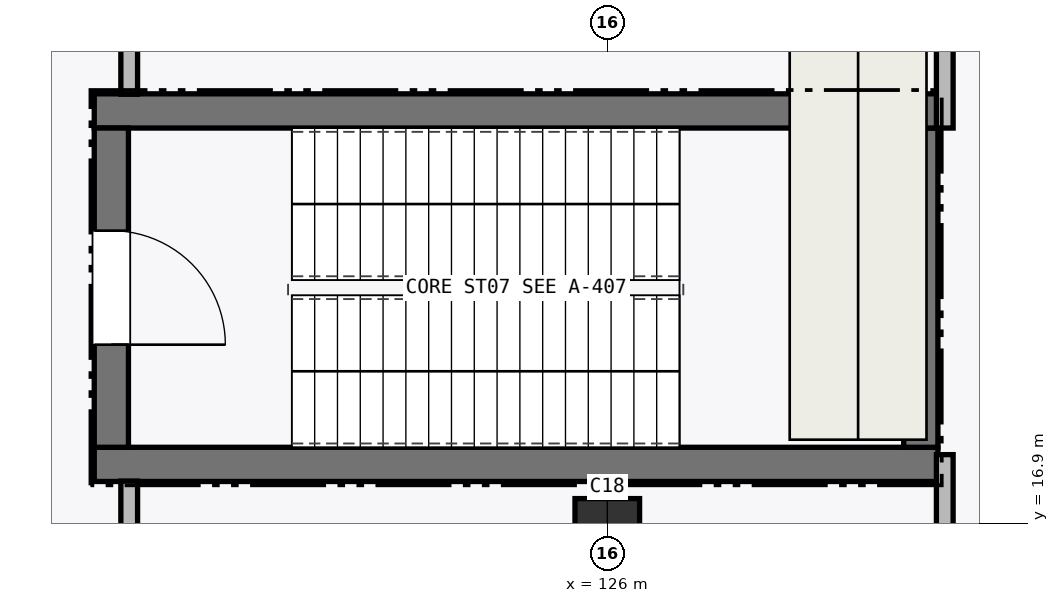
"""IFC4 building model, lengths in metres.
Left out: names, types, materials, properties, quantities, classifications, styles, units other than length and angle.
Written with IfcOpenShell. Run it as: python <this file> out.ifc"""

import sys

from ifc_helpers import new_model, si_unit, direction, frame, frame_2d, origin, origin_2d, place, context, subcontext, project, spatial, rectangle, extrude, element, fill, save


model = new_model("IFC4")
c1 = context("Model", 3, precision=1e-05, world=origin(), true_north=direction((0.0, 1.0)))
c2 = subcontext(c1, "Body", "Model", "MODEL_VIEW")
j1 = project(units=[si_unit("LENGTHUNIT", "METRE"), si_unit("PLANEANGLEUNIT", "RADIAN")], contexts=[c1])
p1 = place(None, origin())
s1 = spatial("IfcSite", under=j1, at=p1, CompositionType="ELEMENT")
p2 = place(p1, origin())
s2 = spatial("IfcBuilding", under=s1, at=p2, CompositionType="ELEMENT")
p3 = place(p2, frame((0.0, 0.0, -5.4)))
s3 = spatial("IfcBuildingStorey", under=s2, at=p3, CompositionType="ELEMENT", Elevation=-5.4)
p4 = place(p3, frame((126.0, 16.8, 0.0), z_axis=(0.0, 0.0, 1.0), x_axis=(1.0, 0.0, 0.0)))
e1 = element("IfcColumn", 1, at=p4, inside=s3, PredefinedType="COLUMN", context=c2, shape_type="SweptSolid", body=[
    extrude(rectangle(XDim=0.85, YDim=0.85, at=origin_2d()), origin(), (0.0, 0.0, 1.0), 5.4),
])
p5 = place(p3, frame((119.25, 17.675, 0.0), z_axis=(0.0, 0.0, 1.0), x_axis=(1.0, 0.0, 0.0)))
e2 = element("IfcWall", 2, at=p5, inside=s3, PredefinedType="SHEAR", context=c2, shape_type="SweptSolid", body=[
    extrude(rectangle(XDim=11.1, YDim=0.45, at=frame_2d((5.55, 0.0))), origin(), (0.0, 0.0, 1.0), 5.145),
])
p6 = place(p3, frame((130.125, 17.9, 0.0), z_axis=(0.0, 0.0, 1.0), x_axis=(0.0, 1.0, 0.0)))
e3 = element("IfcWall", 3, at=p6, inside=s3, PredefinedType="SHEAR", context=c2, shape_type="SweptSolid", body=[
    extrude(rectangle(XDim=4.2, YDim=0.45, at=frame_2d((2.1, 0.0))), origin(), (0.0, 0.0, 1.0), 5.145),
])
p7 = place(p3, frame((130.35, 22.325, 0.0), z_axis=(0.0, 0.0, 1.0), x_axis=(-1.0, 0.0, 0.0)))
e4 = element("IfcWall", 4, at=p7, inside=s3, PredefinedType="SHEAR", context=c2, shape_type="SweptSolid", body=[
    extrude(rectangle(XDim=11.1, YDim=0.45, at=frame_2d((5.55, 0.0))), origin(), (0.0, 0.0, 1.0), 5.145),
])
p8 = place(p3, frame((119.475, 22.1, 0.0), z_axis=(0.0, 0.0, 1.0), x_axis=(0.0, -1.0, 0.0)))
e5 = element("IfcWall", 5, at=p8, inside=s3, PredefinedType="SHEAR", context=c2, shape_type="SweptSolid", body=[
    extrude(rectangle(XDim=4.2, YDim=0.45, at=frame_2d((2.1, 0.0))), origin(), (0.0, 0.0, 1.0), 5.145),
])
p9 = place(p8, frame((1.35, 0.0, 0.0)))
e6 = element("IfcOpeningElement", 6, at=p9, cuts=e5, PredefinedType="OPENING", context=c2, shape_type="SweptSolid", body=[
    extrude(rectangle(XDim=1.5, YDim=2.15, at=frame_2d((0.75, 1.075))), frame((0.0, 0.235, 0.0), z_axis=(0.0, -1.0, 0.0), x_axis=(1.0, 0.0, 0.0)), (0.0, 0.0, 1.0), 0.47),
])
p10 = place(p3, frame((119.71, 29.15, 0.0), z_axis=(0.0, 0.0, 1.0), x_axis=(0.0, -1.0, 0.0)))
e7 = element("IfcWall", 7, at=p10, inside=s3, PredefinedType="PARTITIONING", context=c2, shape_type="SweptSolid", body=[
    extrude(rectangle(XDim=6.605, YDim=0.22, at=frame_2d((3.302, 0.0))), origin(), (0.0, 0.0, 1.0), 5.145),
])
p11 = place(p3, frame((119.71, 17.455, 0.0), z_axis=(0.0, 0.0, 1.0), x_axis=(0.0, -1.0, 0.0)))
e8 = element("IfcWall", 8, at=p11, inside=s3, PredefinedType="PARTITIONING", context=c2, shape_type="SweptSolid", body=[
    extrude(rectangle(XDim=3.655, YDim=0.22, at=frame_2d((1.828, 0.0))), origin(), (0.0, 0.0, 1.0), 5.145),
])
p12 = place(p3, frame((130.44, 8.61, 0.0), z_axis=(0.0, 0.0, 1.0), x_axis=(0.0, 1.0, 0.0)))
e9 = element("IfcWall", 9, at=p12, inside=s3, PredefinedType="PARTITIONING", context=c2, shape_type="SweptSolid", body=[
    extrude(rectangle(XDim=9.193, YDim=0.22, at=frame_2d((4.597, 0.0))), origin(), (0.0, 0.0, 1.0), 5.145),
])
p13 = place(p3, frame((130.44, 22.1, 0.0), z_axis=(0.0, 0.0, 1.0), x_axis=(0.0, 1.0, 0.0)))
e10 = element("IfcWall", 10, at=p13, inside=s3, PredefinedType="PARTITIONING", context=c2, shape_type="SweptSolid", body=[
    extrude(rectangle(XDim=4.896, YDim=0.22, at=frame_2d((2.448, 0.0))), origin(), (0.0, 0.0, 1.0), 5.145),
])
p14 = place(p9, origin())
e11 = element("IfcDoor", 11, at=p14, inside=s3, OperationType="SINGLE_SWING_RIGHT", PredefinedType="DOOR", context=c2, shape_type="SweptSolid", body=[
    extrude(rectangle(XDim=1.5, YDim=2.15, at=frame_2d((0.75, 1.075))), frame((0.0, 0.025, 0.0), z_axis=(0.0, -1.0, 0.0), x_axis=(1.0, 0.0, 0.0)), (0.0, 0.0, 1.0), 0.05),
])
fill(e6, e11)
save(model, sys.argv[1])
